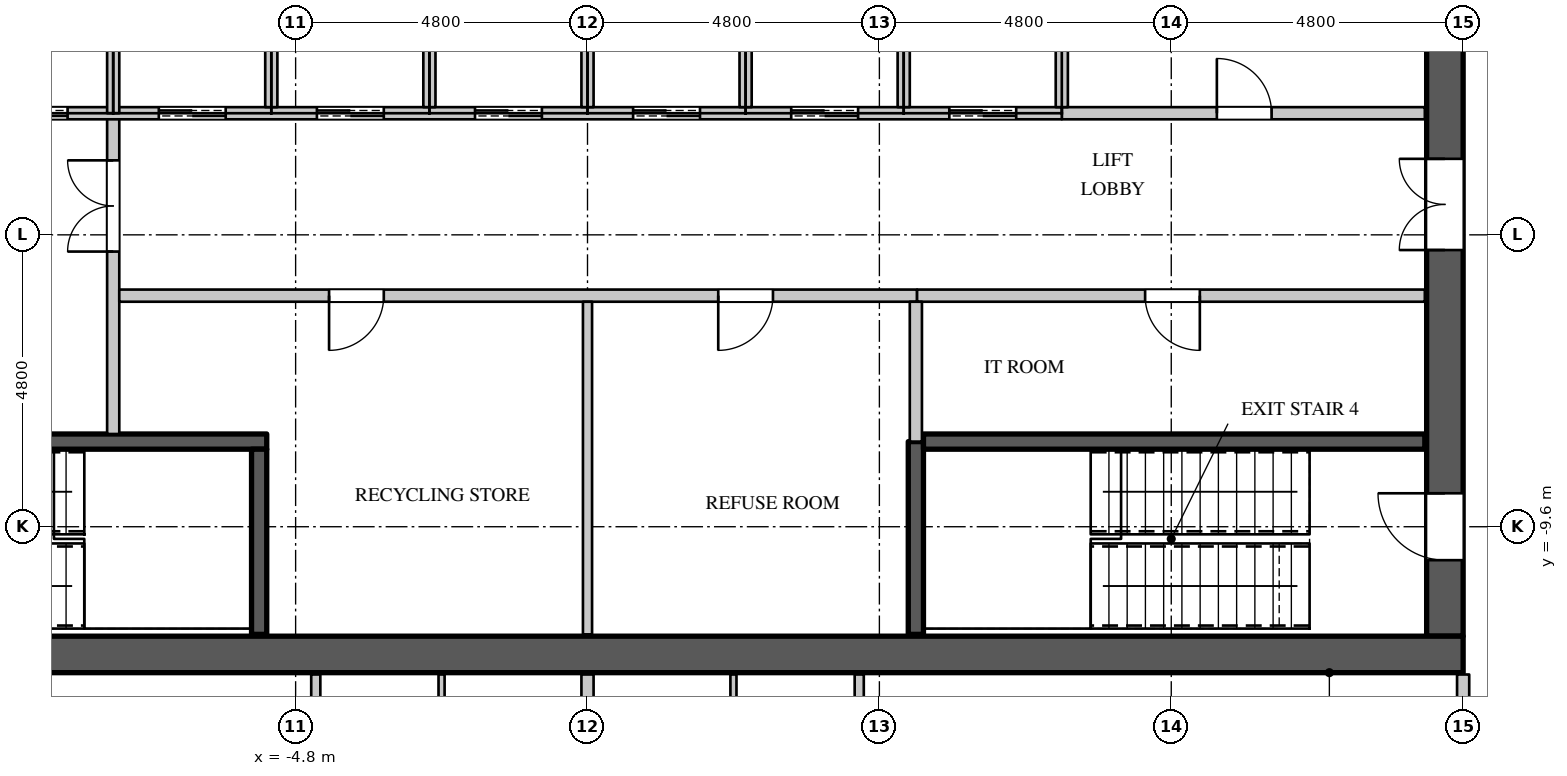
"""IFC4 building model, lengths in metres.
Left out: names, types, materials, properties, quantities, classifications, styles, units other than length and angle.
Written with IfcOpenShell. Run it as: python <this file> out.ifc"""

import sys

from ifc_helpers import new_model, si_unit, direction, frame, frame_2d, origin, place, context, subcontext, project, spatial, rectangle, extrude, element, fill, save


model = new_model("IFC4")
c1 = context("Model", 3, precision=1e-05, world=origin(), true_north=direction((0.0, 1.0)))
c2 = subcontext(c1, "Body", "Model", "MODEL_VIEW")
j1 = project(units=[si_unit("LENGTHUNIT", "METRE"), si_unit("PLANEANGLEUNIT", "RADIAN")], contexts=[c1])
p1 = place(None, origin())
s1 = spatial("IfcSite", under=j1, at=p1, CompositionType="ELEMENT")
p2 = place(p1, origin())
s2 = spatial("IfcBuilding", under=s1, at=p2, CompositionType="ELEMENT")
p3 = place(p2, frame((0.0, 0.0, 239.1)))
s3 = spatial("IfcBuildingStorey", under=s2, at=p3, CompositionType="ELEMENT", Elevation=239.1)
p4 = place(p3, frame((-14.4, -11.7, 0.0), z_axis=(0.0, 0.0, 1.0), x_axis=(1.0, 0.0, 0.0)))
e1 = element("IfcWall", 1, at=p4, inside=s3, PredefinedType="SHEAR", context=c2, shape_type="SweptSolid", body=[
    extrude(rectangle(XDim=28.8, YDim=0.6, at=frame_2d((14.4, 0.0))), origin(), (0.0, 0.0, 1.0), 4.2),
])
p5 = place(p3, frame((14.1, -11.4, 0.0), z_axis=(0.0, 0.0, 1.0), x_axis=(0.0, 1.0, 0.0)))
e2 = element("IfcWall", 2, at=p5, inside=s3, PredefinedType="SHEAR", context=c2, shape_type="SweptSolid", body=[
    extrude(rectangle(XDim=22.8, YDim=0.6, at=frame_2d((11.4, 0.0))), origin(), (0.0, 0.0, 1.0), 4.2),
])
p6 = place(p5, frame((20.45, 0.0, 0.0)))
e3 = element("IfcOpeningElement", 3, at=p6, cuts=e2, PredefinedType="OPENING", context=c2, shape_type="SweptSolid", body=[
    extrude(rectangle(XDim=1.1, YDim=2.2, at=frame_2d((0.55, 1.1))), frame((0.0, 0.31, 0.0), z_axis=(0.0, -1.0, 0.0), x_axis=(1.0, 0.0, 0.0)), (0.0, 0.0, 1.0), 0.62),
])
p7 = place(p5, frame((1.25, 0.0, 0.0)))
e4 = element("IfcOpeningElement", 4, at=p7, cuts=e2, PredefinedType="OPENING", context=c2, shape_type="SweptSolid", body=[
    extrude(rectangle(XDim=1.1, YDim=2.2, at=frame_2d((0.55, 1.1))), frame((0.0, 0.31, 0.0), z_axis=(0.0, -1.0, 0.0), x_axis=(1.0, 0.0, 0.0)), (0.0, 0.0, 1.0), 0.62),
])
p8 = place(p5, frame((14.95, 0.0, 0.0)))
e5 = element("IfcOpeningElement", 5, at=p8, cuts=e2, PredefinedType="OPENING", context=c2, shape_type="SweptSolid", body=[
    extrude(rectangle(XDim=1.5, YDim=2.4, at=frame_2d((0.75, 1.2))), frame((0.0, 0.31, 0.0), z_axis=(0.0, -1.0, 0.0), x_axis=(1.0, 0.0, 0.0)), (0.0, 0.0, 1.0), 0.62),
])
p9 = place(p5, frame((6.35, 0.0, 0.0)))
e6 = element("IfcOpeningElement", 6, at=p9, cuts=e2, PredefinedType="OPENING", context=c2, shape_type="SweptSolid", body=[
    extrude(rectangle(XDim=1.5, YDim=2.4, at=frame_2d((0.75, 1.2))), frame((0.0, 0.31, 0.0), z_axis=(0.0, -1.0, 0.0), x_axis=(1.0, 0.0, 0.0)), (0.0, 0.0, 1.0), 0.62),
])
p10 = place(p3, frame((-7.8, -8.075, 0.0), z_axis=(0.0, 0.0, 1.0), x_axis=(0.0, 1.0, 0.0)))
e7 = element("IfcWall", 7, at=p10, inside=s3, PredefinedType="PARTITIONING", context=c2, shape_type="SweptSolid", body=[
    extrude(rectangle(XDim=5.275, YDim=0.2, at=frame_2d((2.637, 0.0))), origin(), (0.0, 0.0, 1.0), 3.95),
])
p11 = place(p10, frame((3.0, 0.0, 0.0)))
e8 = element("IfcOpeningElement", 8, at=p11, cuts=e7, PredefinedType="OPENING", context=c2, shape_type="SweptSolid", body=[
    extrude(rectangle(XDim=1.5, YDim=2.4, at=frame_2d((0.75, 1.2))), frame((0.0, 0.11, 0.0), z_axis=(0.0, -1.0, 0.0), x_axis=(1.0, 0.0, 0.0)), (0.0, 0.0, 1.0), 0.22),
])
p12 = place(p3, frame((-7.7, -5.8, 0.0), z_axis=(0.0, 0.0, 1.0), x_axis=(1.0, 0.0, 0.0)))
e9 = element("IfcWall", 9, at=p12, inside=s3, PredefinedType="PARTITIONING", context=c2, shape_type="SweptSolid", body=[
    extrude(rectangle(XDim=13.12, YDim=0.2, at=frame_2d((6.56, 0.0))), origin(), (0.0, 0.0, 1.0), 3.95),
])
p13 = place(p12, frame((3.45, 0.0, 0.0)))
e10 = element("IfcOpeningElement", 10, at=p13, cuts=e9, PredefinedType="OPENING", context=c2, shape_type="SweptSolid", body=[
    extrude(rectangle(XDim=0.9, YDim=2.2, at=frame_2d((0.45, 1.1))), frame((0.0, 0.11, 0.0), z_axis=(0.0, -1.0, 0.0), x_axis=(1.0, 0.0, 0.0)), (0.0, 0.0, 1.0), 0.22),
])
p14 = place(p12, frame((9.85, 0.0, 0.0)))
e11 = element("IfcOpeningElement", 11, at=p14, cuts=e9, PredefinedType="OPENING", context=c2, shape_type="SweptSolid", body=[
    extrude(rectangle(XDim=0.9, YDim=2.2, at=frame_2d((0.45, 1.1))), frame((0.0, 0.11, 0.0), z_axis=(0.0, -1.0, 0.0), x_axis=(1.0, 0.0, 0.0)), (0.0, 0.0, 1.0), 0.22),
])
p15 = place(p3, frame((14.4, -14.3, 0.0), z_axis=(0.0, 0.0, 1.0), x_axis=(0.0, 1.0, 0.0)))
e12 = element("IfcWall", 12, at=p15, inside=s3, PredefinedType="PARTITIONING", context=c2, shape_type="SweptSolid", body=[
    extrude(rectangle(XDim=2.27, YDim=0.2, at=frame_2d((1.135, 0.0))), origin(), (0.0, 0.0, 1.0), 3.95),
])
p16 = place(p3, frame((-4.469, -25.95, 0.0), z_axis=(0.0, 0.0, 1.0), x_axis=(0.0, 1.0, 0.0)))
e13 = element("IfcWall", 13, at=p16, inside=s3, PredefinedType="PARTITIONING", context=c2, shape_type="SweptSolid", body=[
    extrude(rectangle(XDim=13.92, YDim=0.15, at=frame_2d((6.96, 0.0))), origin(), (0.0, 0.0, 1.0), 3.3),
])
p17 = place(p16, frame((3.3, 0.0, 0.0)))
e14 = element("IfcOpeningElement", 14, at=p17, cuts=e13, PredefinedType="OPENING", context=c2, shape_type="SweptSolid", body=[
    extrude(rectangle(XDim=0.95, YDim=2.2, at=frame_2d((0.475, 1.1))), frame((0.0, 0.085, 0.0), z_axis=(0.0, -1.0, 0.0), x_axis=(1.0, 0.0, 0.0)), (0.0, 0.0, 1.0), 0.17),
])
p18 = place(p3, frame((0.0, -11.37, 0.0), z_axis=(0.0, 0.0, 1.0), x_axis=(0.0, 1.0, 0.0)))
e15 = element("IfcWall", 15, at=p18, inside=s3, PredefinedType="PARTITIONING", context=c2, shape_type="SweptSolid", body=[
    extrude(rectangle(XDim=5.47, YDim=0.15, at=frame_2d((2.735, 0.0))), origin(), (0.0, 0.0, 1.0), 3.95),
])
p19 = place(p3, frame((4.469, -25.95, 0.0), z_axis=(0.0, 0.0, 1.0), x_axis=(0.0, 1.0, 0.0)))
e16 = element("IfcWall", 16, at=p19, inside=s3, PredefinedType="PARTITIONING", context=c2, shape_type="SweptSolid", body=[
    extrude(rectangle(XDim=13.92, YDim=0.15, at=frame_2d((6.96, 0.0))), origin(), (0.0, 0.0, 1.0), 3.3),
])
p20 = place(p19, frame((3.3, 0.0, 0.0)))
e17 = element("IfcOpeningElement", 17, at=p20, cuts=e16, PredefinedType="OPENING", context=c2, shape_type="SweptSolid", body=[
    extrude(rectangle(XDim=0.95, YDim=2.2, at=frame_2d((0.475, 1.1))), frame((0.0, 0.085, 0.0), z_axis=(0.0, -1.0, 0.0), x_axis=(1.0, 0.0, 0.0)), (0.0, 0.0, 1.0), 0.17),
])
p21 = place(p3, frame((0.0, -26.455, 0.0), z_axis=(0.0, 0.0, 1.0), x_axis=(0.0, 1.0, 0.0)))
e18 = element("IfcWall", 18, at=p21, inside=s3, PredefinedType="PARTITIONING", context=c2, shape_type="SweptSolid", body=[
    extrude(rectangle(XDim=14.425, YDim=0.2, at=frame_2d((7.212, 0.0))), origin(), (0.0, 0.0, 1.0), 3.95),
])
p22 = place(p3, frame((5.42, -5.8, 0.0), z_axis=(0.0, 0.0, 1.0), x_axis=(1.0, 0.0, 0.0)))
e19 = element("IfcWall", 19, at=p22, inside=s3, PredefinedType="PARTITIONING", context=c2, shape_type="SweptSolid", body=[
    extrude(rectangle(XDim=8.35, YDim=0.2, at=frame_2d((4.175, 0.0))), origin(), (0.0, 0.0, 1.0), 3.95),
])
p23 = place(p22, frame((3.75, 0.0, 0.0)))
e20 = element("IfcOpeningElement", 20, at=p23, cuts=e19, PredefinedType="OPENING", context=c2, shape_type="SweptSolid", body=[
    extrude(rectangle(XDim=0.9, YDim=2.2, at=frame_2d((0.45, 1.1))), frame((0.0, 0.11, 0.0), z_axis=(0.0, -1.0, 0.0), x_axis=(1.0, 0.0, 0.0)), (0.0, 0.0, 1.0), 0.22),
])
p24 = place(p3, frame((5.4, -8.2, 0.0), z_axis=(0.0, 0.0, 1.0), x_axis=(0.0, 1.0, 0.0)))
e21 = element("IfcWall", 21, at=p24, inside=s3, PredefinedType="PARTITIONING", context=c2, shape_type="SweptSolid", body=[
    extrude(rectangle(XDim=2.3, YDim=0.2, at=frame_2d((1.15, 0.0))), origin(), (0.0, 0.0, 1.0), 3.95),
])
p25 = place(p3, frame((7.8, -2.8, 0.0), z_axis=(0.0, 0.0, 1.0), x_axis=(1.0, 0.0, 0.0)))
e22 = element("IfcWall", 22, at=p25, inside=s3, PredefinedType="PARTITIONING", context=c2, shape_type="SweptSolid", body=[
    extrude(rectangle(XDim=5.97, YDim=0.2, at=frame_2d((2.985, 0.0))), origin(), (0.0, 0.0, 1.0), 3.95),
])
p26 = place(p25, frame((2.55, 0.0, 0.0)))
e23 = element("IfcOpeningElement", 23, at=p26, cuts=e22, PredefinedType="OPENING", context=c2, shape_type="SweptSolid", body=[
    extrude(rectangle(XDim=0.9, YDim=2.2, at=frame_2d((0.45, 1.1))), frame((0.0, 0.11, 0.0), z_axis=(0.0, -1.0, 0.0), x_axis=(1.0, 0.0, 0.0)), (0.0, 0.0, 1.0), 0.22),
])
p27 = place(p3, frame((-10.4, -2.8, 0.0), z_axis=(0.0, 0.0, 1.0), x_axis=(1.0, 0.0, 0.0)))
e24 = element("IfcWall", 24, at=p27, inside=s3, PredefinedType="PARTITIONING", context=c2, shape_type="SweptSolid", body=[
    extrude(rectangle(XDim=18.2, YDim=0.2, at=frame_2d((9.1, 0.0))), origin(), (0.0, 0.0, 1.0), 3.95),
])
p28 = place(p27, frame((0.75, 0.0, 0.0)))
e25 = element("IfcOpeningElement", 25, at=p28, cuts=e24, PredefinedType="OPENING", context=c2, shape_type="SweptSolid", body=[
    extrude(rectangle(XDim=1.1, YDim=2.2, at=frame_2d((0.55, 1.1))), frame((0.0, 0.11, 0.0), z_axis=(0.0, -1.0, 0.0), x_axis=(1.0, 0.0, 0.0)), (0.0, 0.0, 1.0), 0.22),
])
p29 = place(p27, frame((3.35, 0.0, 0.0)))
e26 = element("IfcOpeningElement", 26, at=p29, cuts=e24, PredefinedType="OPENING", context=c2, shape_type="SweptSolid", body=[
    extrude(rectangle(XDim=1.1, YDim=2.2, at=frame_2d((0.55, 1.1))), frame((0.0, 0.11, 0.0), z_axis=(0.0, -1.0, 0.0), x_axis=(1.0, 0.0, 0.0)), (0.0, 0.0, 1.0), 0.22),
])
p30 = place(p27, frame((5.95, 0.0, 0.0)))
e27 = element("IfcOpeningElement", 27, at=p30, cuts=e24, PredefinedType="OPENING", context=c2, shape_type="SweptSolid", body=[
    extrude(rectangle(XDim=1.1, YDim=2.2, at=frame_2d((0.55, 1.1))), frame((0.0, 0.11, 0.0), z_axis=(0.0, -1.0, 0.0), x_axis=(1.0, 0.0, 0.0)), (0.0, 0.0, 1.0), 0.22),
])
p31 = place(p27, frame((8.55, 0.0, 0.0)))
e28 = element("IfcOpeningElement", 28, at=p31, cuts=e24, PredefinedType="OPENING", context=c2, shape_type="SweptSolid", body=[
    extrude(rectangle(XDim=1.1, YDim=2.2, at=frame_2d((0.55, 1.1))), frame((0.0, 0.11, 0.0), z_axis=(0.0, -1.0, 0.0), x_axis=(1.0, 0.0, 0.0)), (0.0, 0.0, 1.0), 0.22),
])
p32 = place(p27, frame((11.15, 0.0, 0.0)))
e29 = element("IfcOpeningElement", 29, at=p32, cuts=e24, PredefinedType="OPENING", context=c2, shape_type="SweptSolid", body=[
    extrude(rectangle(XDim=1.1, YDim=2.2, at=frame_2d((0.55, 1.1))), frame((0.0, 0.11, 0.0), z_axis=(0.0, -1.0, 0.0), x_axis=(1.0, 0.0, 0.0)), (0.0, 0.0, 1.0), 0.22),
])
p33 = place(p27, frame((13.75, 0.0, 0.0)))
e30 = element("IfcOpeningElement", 30, at=p33, cuts=e24, PredefinedType="OPENING", context=c2, shape_type="SweptSolid", body=[
    extrude(rectangle(XDim=1.1, YDim=2.2, at=frame_2d((0.55, 1.1))), frame((0.0, 0.11, 0.0), z_axis=(0.0, -1.0, 0.0), x_axis=(1.0, 0.0, 0.0)), (0.0, 0.0, 1.0), 0.22),
])
p34 = place(p27, frame((16.35, 0.0, 0.0)))
e31 = element("IfcOpeningElement", 31, at=p34, cuts=e24, PredefinedType="OPENING", context=c2, shape_type="SweptSolid", body=[
    extrude(rectangle(XDim=1.1, YDim=2.2, at=frame_2d((0.55, 1.1))), frame((0.0, 0.11, 0.0), z_axis=(0.0, -1.0, 0.0), x_axis=(1.0, 0.0, 0.0)), (0.0, 0.0, 1.0), 0.22),
])
p35 = place(p3, frame((-7.8, -2.8, 0.0), z_axis=(0.0, 0.0, 1.0), x_axis=(0.0, 1.0, 0.0)))
e32 = element("IfcWall", 32, at=p35, inside=s3, PredefinedType="PARTITIONING", context=c2, shape_type="SweptSolid", body=[
    extrude(rectangle(XDim=2.8, YDim=0.2, at=frame_2d((1.4, 0.0))), origin(), (0.0, 0.0, 1.0), 3.95),
])
for number, where, z_axis, x_axis in (
    (33, (-5.2, -2.7, 0.0), (0.0, 0.0, 1.0), (0.0, 1.0, 0.0)),
    (34, (-2.6, -2.7, 0.0), (0.0, 0.0, 1.0), (0.0, 1.0, 0.0)),
    (35, (0.0, -2.7, 0.0), (0.0, 0.0, 1.0), (0.0, 1.0, 0.0)),
    (36, (2.6, -2.7, 0.0), (0.0, 0.0, 1.0), (0.0, 1.0, 0.0)),
    (37, (5.2, -2.7, 0.0), (0.0, 0.0, 1.0), (0.0, 1.0, 0.0)),
    (38, (7.8, -2.7, 0.0), (0.0, 0.0, 1.0), (0.0, 1.0, 0.0)),
):
    element("IfcWall", number, at=place(p3, frame(where, z_axis=z_axis, x_axis=x_axis)), inside=s3, PredefinedType="PARTITIONING", context=c2, shape_type="SweptSolid", body=[
        extrude(rectangle(XDim=2.6, YDim=0.2, at=frame_2d((1.3, 0.0))), origin(), (0.0, 0.0, 1.0), 3.95),
    ])
p36 = place(p3, frame((-13.77, -8.2, 0.0), z_axis=(0.0, 0.0, 1.0), x_axis=(1.0, 0.0, 0.0)))
e39 = element("IfcWall", 39, at=p36, inside=s3, PredefinedType="SHEAR", context=c2, shape_type="SweptSolid", body=[
    extrude(rectangle(XDim=8.495, YDim=0.25, at=frame_2d((4.248, 0.0))), origin(), (0.0, 0.0, 1.0), 3.95),
])
p37 = place(p36, frame((0.15, 0.0, 0.0)))
e40 = element("IfcOpeningElement", 40, at=p37, cuts=e39, PredefinedType="OPENING", context=c2, shape_type="SweptSolid", body=[
    extrude(rectangle(XDim=1.1, YDim=2.2, at=frame_2d((0.55, 1.1))), frame((0.0, 0.135, 0.0), z_axis=(0.0, -1.0, 0.0), x_axis=(1.0, 0.0, 0.0)), (0.0, 0.0, 1.0), 0.27),
])
p38 = place(p3, frame((-5.4, -11.37, 0.0), z_axis=(0.0, 0.0, 1.0), x_axis=(0.0, 1.0, 0.0)))
e41 = element("IfcWall", 41, at=p38, inside=s3, PredefinedType="SHEAR", context=c2, shape_type="SweptSolid", body=[
    extrude(rectangle(XDim=3.045, YDim=0.25, at=frame_2d((1.522, 0.0))), origin(), (0.0, 0.0, 1.0), 3.95),
])
p39 = place(p3, frame((5.4, -11.37, 0.0), z_axis=(0.0, 0.0, 1.0), x_axis=(0.0, 1.0, 0.0)))
e42 = element("IfcWall", 42, at=p39, inside=s3, PredefinedType="SHEAR", context=c2, shape_type="SweptSolid", body=[
    extrude(rectangle(XDim=3.17, YDim=0.25, at=frame_2d((1.585, 0.0))), origin(), (0.0, 0.0, 1.0), 3.95),
])
p40 = place(p3, frame((5.525, -8.2, 0.0), z_axis=(0.0, 0.0, 1.0), x_axis=(1.0, 0.0, 0.0)))
e43 = element("IfcWall", 43, at=p40, inside=s3, PredefinedType="SHEAR", context=c2, shape_type="SweptSolid", body=[
    extrude(rectangle(XDim=8.245, YDim=0.25, at=frame_2d((4.123, 0.0))), origin(), (0.0, 0.0, 1.0), 3.95),
])
for number, where, z_axis, x_axis in (
    (44, (-2.4, -17.925, 0.0), (0.0, 0.0, 1.0), (0.0, 1.0, 0.0)),
    (45, (2.4, -17.925, 0.0), (0.0, 0.0, 1.0), (0.0, 1.0, 0.0)),
):
    element("IfcWall", number, at=place(p3, frame(where, z_axis=z_axis, x_axis=x_axis)), inside=s3, PredefinedType="PARTITIONING", context=c2, shape_type="SweptSolid", body=[
        extrude(rectangle(XDim=5.895, YDim=0.1, at=frame_2d((2.948, 0.0))), origin(), (0.0, 0.0, 1.0), 3.95),
    ])
p41 = place(p26, origin())
e46 = element("IfcDoor", 46, at=p41, inside=s3, OperationType="SINGLE_SWING_LEFT", PredefinedType="DOOR", context=c2, shape_type="SweptSolid", body=[
    extrude(rectangle(XDim=0.9, YDim=2.2, at=frame_2d((0.45, 1.1))), frame((0.0, 0.025, 0.0), z_axis=(0.0, -1.0, 0.0), x_axis=(1.0, 0.0, 0.0)), (0.0, 0.0, 1.0), 0.05),
])
fill(e23, e46)
p42 = place(p13, origin())
e47 = element("IfcDoor", 47, at=p42, inside=s3, OperationType="SINGLE_SWING_RIGHT", PredefinedType="DOOR", context=c2, shape_type="SweptSolid", body=[
    extrude(rectangle(XDim=0.9, YDim=2.2, at=frame_2d((0.45, 1.1))), frame((0.0, 0.025, 0.0), z_axis=(0.0, -1.0, 0.0), x_axis=(1.0, 0.0, 0.0)), (0.0, 0.0, 1.0), 0.05),
])
fill(e10, e47)
p43 = place(p14, origin())
e48 = element("IfcDoor", 48, at=p43, inside=s3, OperationType="SINGLE_SWING_RIGHT", PredefinedType="DOOR", context=c2, shape_type="SweptSolid", body=[
    extrude(rectangle(XDim=0.9, YDim=2.2, at=frame_2d((0.45, 1.1))), frame((0.0, 0.025, 0.0), z_axis=(0.0, -1.0, 0.0), x_axis=(1.0, 0.0, 0.0)), (0.0, 0.0, 1.0), 0.05),
])
fill(e11, e48)
p44 = place(p23, origin())
e49 = element("IfcDoor", 49, at=p44, inside=s3, OperationType="SINGLE_SWING_LEFT", PredefinedType="DOOR", context=c2, shape_type="SweptSolid", body=[
    extrude(rectangle(XDim=0.9, YDim=2.2, at=frame_2d((0.45, 1.1))), frame((0.0, 0.025, 0.0), z_axis=(0.0, -1.0, 0.0), x_axis=(1.0, 0.0, 0.0)), (0.0, 0.0, 1.0), 0.05),
])
fill(e20, e49)
p45 = place(p28, origin())
e50 = element("IfcDoor", 50, at=p45, inside=s3, OperationType="DOUBLE_DOOR_SLIDING", PredefinedType="DOOR", context=c2, shape_type="SweptSolid", body=[
    extrude(rectangle(XDim=1.1, YDim=2.2, at=frame_2d((0.55, 1.1))), frame((0.0, 0.025, 0.0), z_axis=(0.0, -1.0, 0.0), x_axis=(1.0, 0.0, 0.0)), (0.0, 0.0, 1.0), 0.05),
])
fill(e25, e50)
p46 = place(p29, origin())
e51 = element("IfcDoor", 51, at=p46, inside=s3, OperationType="DOUBLE_DOOR_SLIDING", PredefinedType="DOOR", context=c2, shape_type="SweptSolid", body=[
    extrude(rectangle(XDim=1.1, YDim=2.2, at=frame_2d((0.55, 1.1))), frame((0.0, 0.025, 0.0), z_axis=(0.0, -1.0, 0.0), x_axis=(1.0, 0.0, 0.0)), (0.0, 0.0, 1.0), 0.05),
])
fill(e26, e51)
p47 = place(p30, origin())
e52 = element("IfcDoor", 52, at=p47, inside=s3, OperationType="DOUBLE_DOOR_SLIDING", PredefinedType="DOOR", context=c2, shape_type="SweptSolid", body=[
    extrude(rectangle(XDim=1.1, YDim=2.2, at=frame_2d((0.55, 1.1))), frame((0.0, 0.025, 0.0), z_axis=(0.0, -1.0, 0.0), x_axis=(1.0, 0.0, 0.0)), (0.0, 0.0, 1.0), 0.05),
])
fill(e27, e52)
p48 = place(p31, origin())
e53 = element("IfcDoor", 53, at=p48, inside=s3, OperationType="DOUBLE_DOOR_SLIDING", PredefinedType="DOOR", context=c2, shape_type="SweptSolid", body=[
    extrude(rectangle(XDim=1.1, YDim=2.2, at=frame_2d((0.55, 1.1))), frame((0.0, 0.025, 0.0), z_axis=(0.0, -1.0, 0.0), x_axis=(1.0, 0.0, 0.0)), (0.0, 0.0, 1.0), 0.05),
])
fill(e28, e53)
p49 = place(p32, origin())
e54 = element("IfcDoor", 54, at=p49, inside=s3, OperationType="DOUBLE_DOOR_SLIDING", PredefinedType="DOOR", context=c2, shape_type="SweptSolid", body=[
    extrude(rectangle(XDim=1.1, YDim=2.2, at=frame_2d((0.55, 1.1))), frame((0.0, 0.025, 0.0), z_axis=(0.0, -1.0, 0.0), x_axis=(1.0, 0.0, 0.0)), (0.0, 0.0, 1.0), 0.05),
])
fill(e29, e54)
p50 = place(p33, origin())
e55 = element("IfcDoor", 55, at=p50, inside=s3, OperationType="DOUBLE_DOOR_SLIDING", PredefinedType="DOOR", context=c2, shape_type="SweptSolid", body=[
    extrude(rectangle(XDim=1.1, YDim=2.2, at=frame_2d((0.55, 1.1))), frame((0.0, 0.025, 0.0), z_axis=(0.0, -1.0, 0.0), x_axis=(1.0, 0.0, 0.0)), (0.0, 0.0, 1.0), 0.05),
])
fill(e30, e55)
p51 = place(p34, origin())
e56 = element("IfcDoor", 56, at=p51, inside=s3, OperationType="DOUBLE_DOOR_SLIDING", PredefinedType="DOOR", context=c2, shape_type="SweptSolid", body=[
    extrude(rectangle(XDim=1.1, YDim=2.2, at=frame_2d((0.55, 1.1))), frame((0.0, 0.025, 0.0), z_axis=(0.0, -1.0, 0.0), x_axis=(1.0, 0.0, 0.0)), (0.0, 0.0, 1.0), 0.05),
])
fill(e31, e56)
p52 = place(p11, origin())
e57 = element("IfcDoor", 57, at=p52, inside=s3, OperationType="DOUBLE_DOOR_SINGLE_SWING", PredefinedType="DOOR", context=c2, shape_type="SweptSolid", body=[
    extrude(rectangle(XDim=1.5, YDim=2.4, at=frame_2d((0.75, 1.2))), frame((0.0, 0.025, 0.0), z_axis=(0.0, -1.0, 0.0), x_axis=(1.0, 0.0, 0.0)), (0.0, 0.0, 1.0), 0.05),
])
fill(e8, e57)
p53 = place(p7, origin())
e58 = element("IfcDoor", 58, at=p53, inside=s3, OperationType="SINGLE_SWING_RIGHT", PredefinedType="DOOR", context=c2, shape_type="SweptSolid", body=[
    extrude(rectangle(XDim=1.1, YDim=2.2, at=frame_2d((0.55, 1.1))), frame((0.0, 0.295, 0.0), z_axis=(0.0, -1.0, 0.0), x_axis=(1.0, 0.0, 0.0)), (0.0, 0.0, 1.0), 0.05),
])
fill(e4, e58)
p54 = place(p9, origin())
e59 = element("IfcDoor", 59, at=p54, inside=s3, OperationType="DOUBLE_DOOR_SINGLE_SWING", PredefinedType="DOOR", context=c2, shape_type="SweptSolid", body=[
    extrude(rectangle(XDim=1.5, YDim=2.4, at=frame_2d((0.75, 1.2))), frame((0.0, 0.295, 0.0), z_axis=(0.0, -1.0, 0.0), x_axis=(1.0, 0.0, 0.0)), (0.0, 0.0, 1.0), 0.05),
])
fill(e6, e59)
save(model, sys.argv[1])
